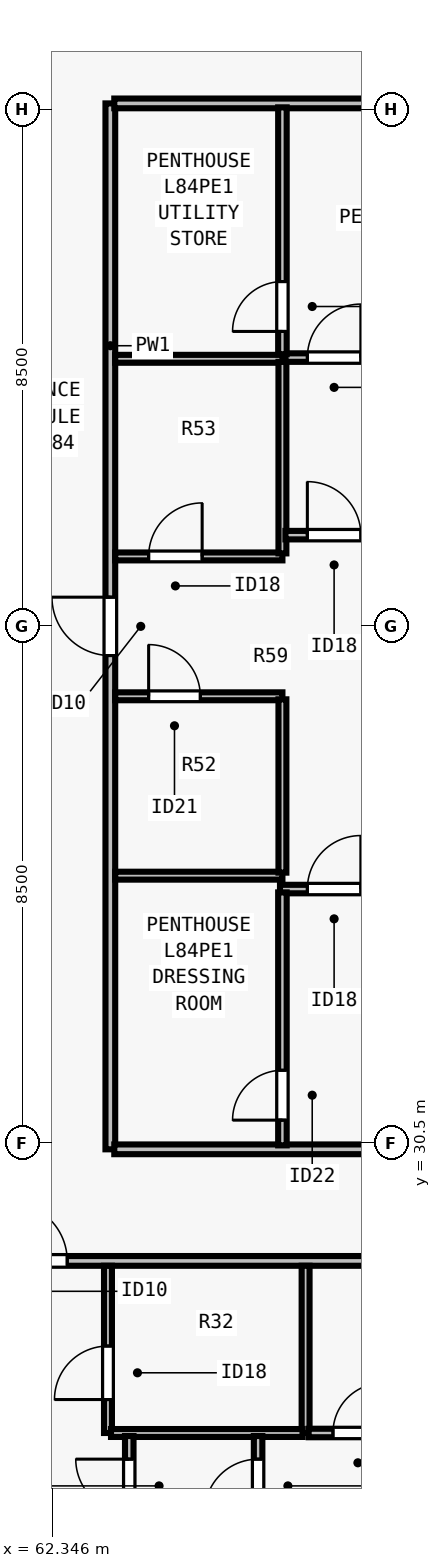
"""IFC4 building model, lengths in metres.
Left out: names, types, materials, properties, quantities, classifications, styles, units other than length and angle.
Written with IfcOpenShell. Run it as: python <this file> out.ifc"""

import sys

from ifc_helpers import new_model, si_unit, direction, frame, frame_2d, origin, place, context, subcontext, project, spatial, rectangle, extrude, element, fill, save


model = new_model("IFC4")
c1 = context("Model", 3, precision=1e-05, world=origin(), true_north=direction((0.0, 1.0)))
c2 = subcontext(c1, "Body", "Model", "MODEL_VIEW")
j1 = project(units=[si_unit("LENGTHUNIT", "METRE"), si_unit("PLANEANGLEUNIT", "RADIAN")], contexts=[c1])
p1 = place(None, origin())
s1 = spatial("IfcSite", under=j1, at=p1, CompositionType="ELEMENT")
p2 = place(p1, origin())
s2 = spatial("IfcBuilding", under=s1, at=p2, CompositionType="ELEMENT")
p3 = place(p2, frame((0.0, 0.0, 305.0)))
s3 = spatial("IfcBuildingStorey", under=s2, at=p3, CompositionType="ELEMENT", Elevation=305.0)
p4 = place(p3, frame((31.285, 28.565, 0.0), z_axis=(0.0, 0.0, 1.0), x_axis=(1.0, 0.0, 0.0)))
e1 = element("IfcWall", 1, at=p4, inside=s3, PredefinedType="PARTITIONING", context=c2, shape_type="SweptSolid", body=[
    extrude(rectangle(XDim=41.43, YDim=0.16, at=frame_2d((20.715, 0.0))), origin(), (0.0, 0.0, 1.0), 3.009),
])
p5 = place(p4, frame((9.766, 0.0, 0.0)))
e2 = element("IfcOpeningElement", 2, at=p5, cuts=e1, PredefinedType="OPENING", context=c2, shape_type="SweptSolid", body=[
    extrude(rectangle(XDim=0.96, YDim=2.18, at=frame_2d((0.48, 1.09))), frame((0.0, 0.09, 0.0), z_axis=(0.0, -1.0, 0.0), x_axis=(1.0, 0.0, 0.0)), (0.0, 0.0, 1.0), 0.18),
])
p6 = place(p4, frame((30.346, 0.0, 0.0)))
e3 = element("IfcOpeningElement", 3, at=p6, cuts=e1, PredefinedType="OPENING", context=c2, shape_type="SweptSolid", body=[
    extrude(rectangle(XDim=0.96, YDim=2.18, at=frame_2d((0.48, 1.09))), frame((0.0, 0.09, 0.0), z_axis=(0.0, -1.0, 0.0), x_axis=(1.0, 0.0, 0.0)), (0.0, 0.0, 1.0), 0.18),
])
p7 = place(p3, frame((63.3, 30.4, 0.0), z_axis=(0.0, 0.0, 1.0), x_axis=(0.0, 1.0, 0.0)))
e4 = element("IfcWall", 4, at=p7, inside=s3, PredefinedType="PARTITIONING", context=c2, shape_type="SweptSolid", body=[
    extrude(rectangle(XDim=17.2, YDim=0.16, at=frame_2d((8.6, 0.0))), origin(), (0.0, 0.0, 1.0), 3.29),
])
p8 = place(p7, frame((8.12, 0.0, 0.0)))
e5 = element("IfcOpeningElement", 5, at=p8, cuts=e4, PredefinedType="OPENING", context=c2, shape_type="SweptSolid", body=[
    extrude(rectangle(XDim=0.96, YDim=2.18, at=frame_2d((0.48, 1.09))), frame((0.0, 0.09, 0.0), z_axis=(0.0, -1.0, 0.0), x_axis=(1.0, 0.0, 0.0)), (0.0, 0.0, 1.0), 0.18),
])
for number, where, z_axis, x_axis in (
    (6, (63.365, 30.4, 0.0), (0.0, 0.0, 1.0), (1.0, 0.0, 0.0)),
    (7, (63.365, 47.6, 0.0), (0.0, 0.0, 1.0), (1.0, 0.0, 0.0)),
):
    element("IfcWall", number, at=place(p3, frame(where, z_axis=z_axis, x_axis=x_axis)), inside=s3, PredefinedType="PARTITIONING", context=c2, shape_type="SweptSolid", body=[
        extrude(rectangle(XDim=9.35, YDim=0.16, at=frame_2d((4.675, 0.0))), origin(), (0.0, 0.0, 1.0), 3.29),
    ])
p9 = place(p3, frame((66.511, 25.735, 0.0), z_axis=(0.0, 0.0, 1.0), x_axis=(0.0, 1.0, 0.0)))
e8 = element("IfcWall", 8, at=p9, inside=s3, PredefinedType="PLUMBINGWALL", context=c2, shape_type="SweptSolid", body=[
    extrude(rectangle(XDim=2.75, YDim=0.13, at=frame_2d((1.375, 0.0))), origin(), (0.0, 0.0, 1.0), 3.29),
])
p10 = place(p3, frame((63.261, 25.735, 0.0), z_axis=(0.0, 0.0, 1.0), x_axis=(0.0, 1.0, 0.0)))
e9 = element("IfcWall", 9, at=p10, inside=s3, PredefinedType="PLUMBINGWALL", context=c2, shape_type="SweptSolid", body=[
    extrude(rectangle(XDim=2.75, YDim=0.13, at=frame_2d((1.375, 0.0))), origin(), (0.0, 0.0, 1.0), 3.29),
])
p11 = place(p10, frame((0.55, 0.0, 0.0)))
e10 = element("IfcOpeningElement", 10, at=p11, cuts=e9, PredefinedType="OPENING", context=c2, shape_type="SweptSolid", body=[
    extrude(rectangle(XDim=0.88, YDim=2.1, at=frame_2d((0.44, 1.05))), frame((0.0, 0.075, 0.0), z_axis=(0.0, -1.0, 0.0), x_axis=(1.0, 0.0, 0.0)), (0.0, 0.0, 1.0), 0.15),
])
p12 = place(p3, frame((63.311, 25.735, 0.0), z_axis=(0.0, 0.0, 1.0), x_axis=(1.0, 0.0, 0.0)))
e11 = element("IfcWall", 11, at=p12, inside=s3, PredefinedType="PLUMBINGWALL", context=c2, shape_type="SweptSolid", body=[
    extrude(rectangle(XDim=3.15, YDim=0.13, at=frame_2d((1.575, 0.0))), origin(), (0.0, 0.0, 1.0), 3.29),
])
p13 = place(p3, frame((65.73, 18.38, 0.0), z_axis=(0.0, 0.0, 1.0), x_axis=(0.0, 1.0, 0.0)))
e12 = element("IfcWall", 12, at=p13, inside=s3, PredefinedType="PARTITIONING", context=c2, shape_type="SweptSolid", body=[
    extrude(rectangle(XDim=7.305, YDim=0.14, at=frame_2d((3.653, 0.0))), origin(), (0.0, 0.0, 1.0), 2.653),
])
p14 = place(p13, frame((6.045, 0.0, 0.0)))
e13 = element("IfcOpeningElement", 13, at=p14, cuts=e12, PredefinedType="OPENING", context=c2, shape_type="SweptSolid", body=[
    extrude(rectangle(XDim=0.88, YDim=2.1, at=frame_2d((0.44, 1.05))), frame((0.0, 0.08, 0.0), z_axis=(0.0, -1.0, 0.0), x_axis=(1.0, 0.0, 0.0)), (0.0, 0.0, 1.0), 0.16),
])
p15 = place(p3, frame((66.561, 25.735, 0.0), z_axis=(0.0, 0.0, 1.0), x_axis=(1.0, 0.0, 0.0)))
e14 = element("IfcWall", 14, at=p15, inside=s3, PredefinedType="PARTITIONING", context=c2, shape_type="SweptSolid", body=[
    extrude(rectangle(XDim=6.069, YDim=0.14, at=frame_2d((3.034, 0.0))), origin(), (0.0, 0.0, 1.0), 3.009),
])
p16 = place(p15, frame((0.4, 0.0, 0.0)))
e15 = element("IfcOpeningElement", 15, at=p16, cuts=e14, PredefinedType="OPENING", context=c2, shape_type="SweptSolid", body=[
    extrude(rectangle(XDim=0.82, YDim=2.1, at=frame_2d((0.41, 1.05))), frame((0.0, 0.08, 0.0), z_axis=(0.0, -1.0, 0.0), x_axis=(1.0, 0.0, 0.0)), (0.0, 0.0, 1.0), 0.16),
])
p17 = place(p3, frame((63.611, 18.38, 0.0), z_axis=(0.0, 0.0, 1.0), x_axis=(0.0, 1.0, 0.0)))
e16 = element("IfcWall", 16, at=p17, inside=s3, PredefinedType="PARTITIONING", context=c2, shape_type="SweptSolid", body=[
    extrude(rectangle(XDim=7.305, YDim=0.14, at=frame_2d((3.653, 0.0))), origin(), (0.0, 0.0, 1.0), 2.653),
])
p18 = place(p17, frame((6.045, 0.0, 0.0)))
e17 = element("IfcOpeningElement", 17, at=p18, cuts=e16, PredefinedType="OPENING", context=c2, shape_type="SweptSolid", body=[
    extrude(rectangle(XDim=0.88, YDim=2.1, at=frame_2d((0.44, 1.05))), frame((0.0, 0.08, 0.0), z_axis=(0.0, -1.0, 0.0), x_axis=(1.0, 0.0, 0.0)), (0.0, 0.0, 1.0), 0.16),
])
p19 = place(p3, frame((63.38, 34.9, 0.0), z_axis=(0.0, 0.0, 1.0), x_axis=(1.0, 0.0, 0.0)))
e18 = element("IfcWall", 18, at=p19, inside=s3, PredefinedType="PLUMBINGWALL", context=c2, shape_type="SweptSolid", body=[
    extrude(rectangle(XDim=2.75, YDim=0.13, at=frame_2d((1.375, 0.0))), origin(), (0.0, 0.0, 1.0), 3.29),
])
p20 = place(p3, frame((63.38, 37.85, 0.0), z_axis=(0.0, 0.0, 1.0), x_axis=(1.0, 0.0, 0.0)))
e19 = element("IfcWall", 19, at=p20, inside=s3, PredefinedType="PLUMBINGWALL", context=c2, shape_type="SweptSolid", body=[
    extrude(rectangle(XDim=2.75, YDim=0.13, at=frame_2d((1.375, 0.0))), origin(), (0.0, 0.0, 1.0), 3.29),
])
p21 = place(p20, frame((0.55, 0.0, 0.0)))
e20 = element("IfcOpeningElement", 20, at=p21, cuts=e19, PredefinedType="OPENING", context=c2, shape_type="SweptSolid", body=[
    extrude(rectangle(XDim=0.85, YDim=2.08, at=frame_2d((0.425, 1.04))), frame((0.0, 0.075, 0.0), z_axis=(0.0, -1.0, 0.0), x_axis=(1.0, 0.0, 0.0)), (0.0, 0.0, 1.0), 0.15),
])
p22 = place(p3, frame((66.13, 34.95, 0.0), z_axis=(0.0, 0.0, 1.0), x_axis=(0.0, 1.0, 0.0)))
e21 = element("IfcWall", 21, at=p22, inside=s3, PredefinedType="PLUMBINGWALL", context=c2, shape_type="SweptSolid", body=[
    extrude(rectangle(XDim=2.85, YDim=0.13, at=frame_2d((1.425, 0.0))), origin(), (0.0, 0.0, 1.0), 3.29),
])
p23 = place(p3, frame((63.38, 43.4, 0.0), z_axis=(0.0, 0.0, 1.0), x_axis=(1.0, 0.0, 0.0)))
e22 = element("IfcWall", 22, at=p23, inside=s3, PredefinedType="PLUMBINGWALL", context=c2, shape_type="SweptSolid", body=[
    extrude(rectangle(XDim=2.75, YDim=0.13, at=frame_2d((1.375, 0.0))), origin(), (0.0, 0.0, 1.0), 3.29),
])
p24 = place(p3, frame((63.38, 40.15, 0.0), z_axis=(0.0, 0.0, 1.0), x_axis=(1.0, 0.0, 0.0)))
e23 = element("IfcWall", 23, at=p24, inside=s3, PredefinedType="PLUMBINGWALL", context=c2, shape_type="SweptSolid", body=[
    extrude(rectangle(XDim=2.75, YDim=0.13, at=frame_2d((1.375, 0.0))), origin(), (0.0, 0.0, 1.0), 3.29),
])
p25 = place(p24, frame((0.55, 0.0, 0.0)))
e24 = element("IfcOpeningElement", 24, at=p25, cuts=e23, PredefinedType="OPENING", context=c2, shape_type="SweptSolid", body=[
    extrude(rectangle(XDim=0.88, YDim=2.1, at=frame_2d((0.44, 1.05))), frame((0.0, 0.075, 0.0), z_axis=(0.0, -1.0, 0.0), x_axis=(1.0, 0.0, 0.0)), (0.0, 0.0, 1.0), 0.15),
])
p26 = place(p3, frame((66.13, 40.2, 0.0), z_axis=(0.0, 0.0, 1.0), x_axis=(0.0, 1.0, 0.0)))
e25 = element("IfcWall", 25, at=p26, inside=s3, PredefinedType="PLUMBINGWALL", context=c2, shape_type="SweptSolid", body=[
    extrude(rectangle(XDim=3.15, YDim=0.13, at=frame_2d((1.575, 0.0))), origin(), (0.0, 0.0, 1.0), 3.29),
])
p27 = place(p3, frame((66.09, 34.68, 0.0), z_axis=(0.0, 0.0, 1.0), x_axis=(1.0, 0.0, 0.0)))
e26 = element("IfcWall", 26, at=p27, inside=s3, PredefinedType="PARTITIONING", context=c2, shape_type="SweptSolid", body=[
    extrude(rectangle(XDim=6.53, YDim=0.14, at=frame_2d((3.265, 0.0))), origin(), (0.0, 0.0, 1.0), 3.29),
])
p28 = place(p27, frame((0.45, 0.0, 0.0)))
e27 = element("IfcOpeningElement", 27, at=p28, cuts=e26, PredefinedType="OPENING", context=c2, shape_type="SweptSolid", body=[
    extrude(rectangle(XDim=0.88, YDim=2.1, at=frame_2d((0.44, 1.05))), frame((0.0, 0.08, 0.0), z_axis=(0.0, -1.0, 0.0), x_axis=(1.0, 0.0, 0.0)), (0.0, 0.0, 1.0), 0.16),
])
p29 = place(p3, frame((66.13, 30.465, 0.0), z_axis=(0.0, 0.0, 1.0), x_axis=(0.0, 1.0, 0.0)))
e28 = element("IfcWall", 28, at=p29, inside=s3, PredefinedType="PARTITIONING", context=c2, shape_type="SweptSolid", body=[
    extrude(rectangle(XDim=4.16, YDim=0.14, at=frame_2d((2.08, 0.0))), origin(), (0.0, 0.0, 1.0), 3.29),
])
p30 = place(p29, frame((0.415, 0.0, 0.0)))
e29 = element("IfcOpeningElement", 29, at=p30, cuts=e28, PredefinedType="OPENING", context=c2, shape_type="SweptSolid", body=[
    extrude(rectangle(XDim=0.82, YDim=2.1, at=frame_2d((0.41, 1.05))), frame((0.0, 0.08, 0.0), z_axis=(0.0, -1.0, 0.0), x_axis=(1.0, 0.0, 0.0)), (0.0, 0.0, 1.0), 0.16),
])
p31 = place(p3, frame((66.18, 43.42, 0.0), z_axis=(0.0, 0.0, 1.0), x_axis=(1.0, 0.0, 0.0)))
e30 = element("IfcWall", 30, at=p31, inside=s3, PredefinedType="PARTITIONING", context=c2, shape_type="SweptSolid", body=[
    extrude(rectangle(XDim=6.44, YDim=0.14, at=frame_2d((3.22, 0.0))), origin(), (0.0, 0.0, 1.0), 3.29),
])
p32 = place(p31, frame((0.36, 0.0, 0.0)))
e31 = element("IfcOpeningElement", 31, at=p32, cuts=e30, PredefinedType="OPENING", context=c2, shape_type="SweptSolid", body=[
    extrude(rectangle(XDim=0.88, YDim=2.1, at=frame_2d((0.44, 1.05))), frame((0.0, 0.08, 0.0), z_axis=(0.0, -1.0, 0.0), x_axis=(1.0, 0.0, 0.0)), (0.0, 0.0, 1.0), 0.16),
])
p33 = place(p3, frame((66.13, 43.475, 0.0), z_axis=(0.0, 0.0, 1.0), x_axis=(0.0, 1.0, 0.0)))
e32 = element("IfcWall", 32, at=p33, inside=s3, PredefinedType="PARTITIONING", context=c2, shape_type="SweptSolid", body=[
    extrude(rectangle(XDim=4.06, YDim=0.14, at=frame_2d((2.03, 0.0))), origin(), (0.0, 0.0, 1.0), 3.29),
])
p34 = place(p33, frame((0.375, 0.0, 0.0)))
e33 = element("IfcOpeningElement", 33, at=p34, cuts=e32, PredefinedType="OPENING", context=c2, shape_type="SweptSolid", body=[
    extrude(rectangle(XDim=0.82, YDim=2.1, at=frame_2d((0.41, 1.05))), frame((0.0, 0.08, 0.0), z_axis=(0.0, -1.0, 0.0), x_axis=(1.0, 0.0, 0.0)), (0.0, 0.0, 1.0), 0.16),
])
p35 = place(p3, frame((66.18, 40.5, 0.0), z_axis=(0.0, 0.0, 1.0), x_axis=(1.0, 0.0, 0.0)))
e34 = element("IfcWall", 34, at=p35, inside=s3, PredefinedType="PARTITIONING", context=c2, shape_type="SweptSolid", body=[
    extrude(rectangle(XDim=4.085, YDim=0.14, at=frame_2d((2.042, 0.0))), origin(), (0.0, 0.0, 1.0), 3.29),
])
p36 = place(p35, frame((0.36, 0.0, 0.0)))
e35 = element("IfcOpeningElement", 35, at=p36, cuts=e34, PredefinedType="OPENING", context=c2, shape_type="SweptSolid", body=[
    extrude(rectangle(XDim=0.88, YDim=2.1, at=frame_2d((0.44, 1.05))), frame((0.0, 0.08, 0.0), z_axis=(0.0, -1.0, 0.0), x_axis=(1.0, 0.0, 0.0)), (0.0, 0.0, 1.0), 0.16),
])
p37 = place(p11, origin())
e36 = element("IfcDoor", 36, at=p37, inside=s3, OperationType="SINGLE_SWING_LEFT", PredefinedType="DOOR", context=c2, shape_type="SweptSolid", body=[
    extrude(rectangle(XDim=0.88, YDim=2.1, at=frame_2d((0.44, 1.05))), frame((0.0, 0.025, 0.0), z_axis=(0.0, -1.0, 0.0), x_axis=(1.0, 0.0, 0.0)), (0.0, 0.0, 1.0), 0.05),
])
fill(e10, e36)
p38 = place(p16, origin())
e37 = element("IfcDoor", 37, at=p38, inside=s3, OperationType="SINGLE_SWING_RIGHT", PredefinedType="DOOR", context=c2, shape_type="SweptSolid", body=[
    extrude(rectangle(XDim=0.82, YDim=2.1, at=frame_2d((0.41, 1.05))), frame((0.0, 0.025, 0.0), z_axis=(0.0, -1.0, 0.0), x_axis=(1.0, 0.0, 0.0)), (0.0, 0.0, 1.0), 0.05),
])
fill(e15, e37)
p39 = place(p14, origin())
e38 = element("IfcDoor", 38, at=p39, inside=s3, OperationType="SINGLE_SWING_LEFT", PredefinedType="DOOR", context=c2, shape_type="SweptSolid", body=[
    extrude(rectangle(XDim=0.88, YDim=2.1, at=frame_2d((0.44, 1.05))), frame((0.0, 0.025, 0.0), z_axis=(0.0, -1.0, 0.0), x_axis=(1.0, 0.0, 0.0)), (0.0, 0.0, 1.0), 0.05),
])
fill(e13, e38)
p40 = place(p18, origin())
e39 = element("IfcDoor", 39, at=p40, inside=s3, OperationType="SINGLE_SWING_RIGHT", PredefinedType="DOOR", context=c2, shape_type="SweptSolid", body=[
    extrude(rectangle(XDim=0.88, YDim=2.1, at=frame_2d((0.44, 1.05))), frame((0.0, 0.025, 0.0), z_axis=(0.0, -1.0, 0.0), x_axis=(1.0, 0.0, 0.0)), (0.0, 0.0, 1.0), 0.05),
])
fill(e17, e39)
p41 = place(p6, origin())
e40 = element("IfcDoor", 40, at=p41, inside=s3, OperationType="SINGLE_SWING_LEFT", PredefinedType="DOOR", context=c2, shape_type="SweptSolid", body=[
    extrude(rectangle(XDim=0.96, YDim=2.18, at=frame_2d((0.48, 1.09))), frame((0.0, 0.025, 0.0), z_axis=(0.0, -1.0, 0.0), x_axis=(1.0, 0.0, 0.0)), (0.0, 0.0, 1.0), 0.05),
])
fill(e3, e40)
p42 = place(p21, origin())
e41 = element("IfcDoor", 41, at=p42, inside=s3, OperationType="SINGLE_SWING_LEFT", PredefinedType="DOOR", context=c2, shape_type="SweptSolid", body=[
    extrude(rectangle(XDim=0.85, YDim=2.08, at=frame_2d((0.425, 1.04))), frame((0.0, 0.025, 0.0), z_axis=(0.0, -1.0, 0.0), x_axis=(1.0, 0.0, 0.0)), (0.0, 0.0, 1.0), 0.05),
])
fill(e20, e41)
p43 = place(p25, origin())
e42 = element("IfcDoor", 42, at=p43, inside=s3, OperationType="SINGLE_SWING_RIGHT", PredefinedType="DOOR", context=c2, shape_type="SweptSolid", body=[
    extrude(rectangle(XDim=0.88, YDim=2.1, at=frame_2d((0.44, 1.05))), frame((0.0, 0.025, 0.0), z_axis=(0.0, -1.0, 0.0), x_axis=(1.0, 0.0, 0.0)), (0.0, 0.0, 1.0), 0.05),
])
fill(e24, e42)
p44 = place(p30, origin())
e43 = element("IfcDoor", 43, at=p44, inside=s3, OperationType="SINGLE_SWING_LEFT", PredefinedType="DOOR", context=c2, shape_type="SweptSolid", body=[
    extrude(rectangle(XDim=0.82, YDim=2.1, at=frame_2d((0.41, 1.05))), frame((0.0, 0.025, 0.0), z_axis=(0.0, -1.0, 0.0), x_axis=(1.0, 0.0, 0.0)), (0.0, 0.0, 1.0), 0.05),
])
fill(e29, e43)
p45 = place(p28, origin())
e44 = element("IfcDoor", 44, at=p45, inside=s3, OperationType="SINGLE_SWING_RIGHT", PredefinedType="DOOR", context=c2, shape_type="SweptSolid", body=[
    extrude(rectangle(XDim=0.88, YDim=2.1, at=frame_2d((0.44, 1.05))), frame((0.0, 0.025, 0.0), z_axis=(0.0, -1.0, 0.0), x_axis=(1.0, 0.0, 0.0)), (0.0, 0.0, 1.0), 0.05),
])
fill(e27, e44)
p46 = place(p34, origin())
e45 = element("IfcDoor", 45, at=p46, inside=s3, OperationType="SINGLE_SWING_LEFT", PredefinedType="DOOR", context=c2, shape_type="SweptSolid", body=[
    extrude(rectangle(XDim=0.82, YDim=2.1, at=frame_2d((0.41, 1.05))), frame((0.0, 0.025, 0.0), z_axis=(0.0, -1.0, 0.0), x_axis=(1.0, 0.0, 0.0)), (0.0, 0.0, 1.0), 0.05),
])
fill(e33, e45)
p47 = place(p32, origin())
e46 = element("IfcDoor", 46, at=p47, inside=s3, OperationType="SINGLE_SWING_RIGHT", PredefinedType="DOOR", context=c2, shape_type="SweptSolid", body=[
    extrude(rectangle(XDim=0.88, YDim=2.1, at=frame_2d((0.44, 1.05))), frame((0.0, 0.025, 0.0), z_axis=(0.0, -1.0, 0.0), x_axis=(1.0, 0.0, 0.0)), (0.0, 0.0, 1.0), 0.05),
])
fill(e31, e46)
p48 = place(p36, origin())
e47 = element("IfcDoor", 47, at=p48, inside=s3, OperationType="SINGLE_SWING_LEFT", PredefinedType="DOOR", context=c2, shape_type="SweptSolid", body=[
    extrude(rectangle(XDim=0.88, YDim=2.1, at=frame_2d((0.44, 1.05))), frame((0.0, 0.025, 0.0), z_axis=(0.0, -1.0, 0.0), x_axis=(1.0, 0.0, 0.0)), (0.0, 0.0, 1.0), 0.05),
])
fill(e35, e47)
p49 = place(p8, origin())
e48 = element("IfcDoor", 48, at=p49, inside=s3, OperationType="SINGLE_SWING_RIGHT", PredefinedType="DOOR", context=c2, shape_type="SweptSolid", body=[
    extrude(rectangle(XDim=0.96, YDim=2.18, at=frame_2d((0.48, 1.09))), frame((0.0, 0.025, 0.0), z_axis=(0.0, -1.0, 0.0), x_axis=(1.0, 0.0, 0.0)), (0.0, 0.0, 1.0), 0.05),
])
fill(e5, e48)
save(model, sys.argv[1])
